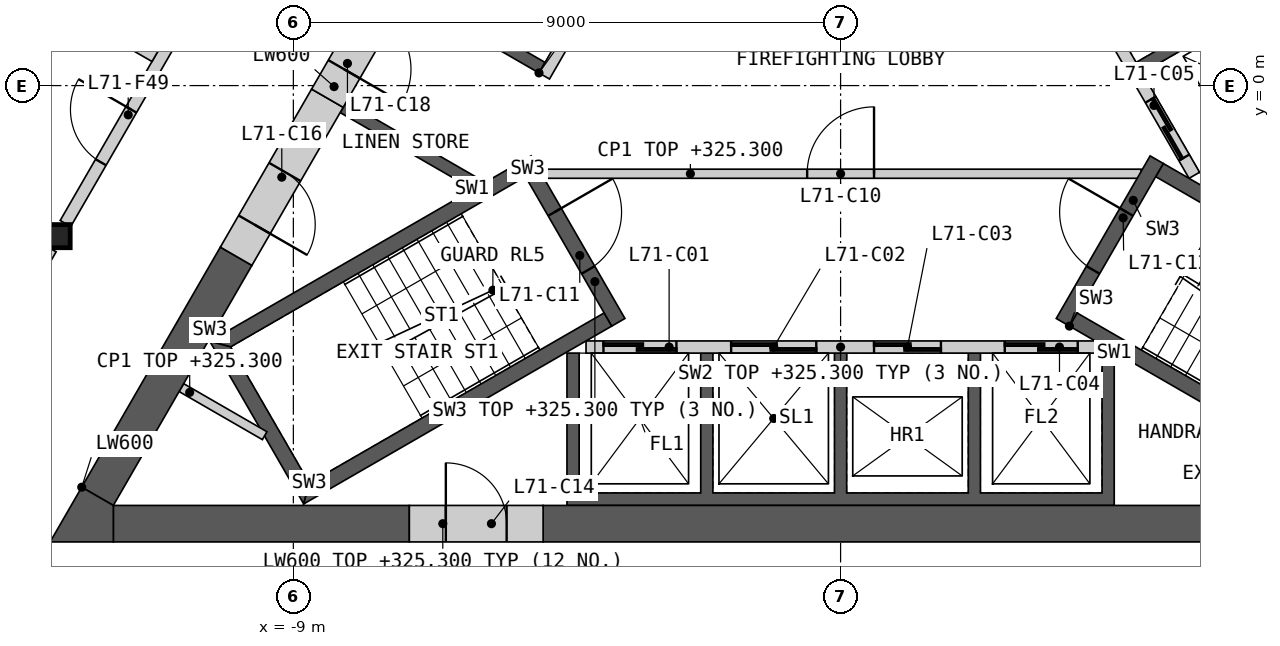
"""IFC4 building model, lengths in metres.
Left out: names, types, materials, properties, quantities, classifications, styles, units other than length and angle.
Written with IfcOpenShell. Run it as: python <this file> out.ifc"""

import sys

from ifc_helpers import new_model, si_unit, direction, frame, frame_2d, origin, origin_2d, place, context, subcontext, project, spatial, polyline, rectangle, i_section, outline, extrude, element, fill, save


model = new_model("IFC4")
c1 = context("Model", 3, precision=1e-05, world=origin(), true_north=direction((0.0, 1.0)))
c2 = subcontext(c1, "Body", "Model", "MODEL_VIEW")
j1 = project(units=[si_unit("LENGTHUNIT", "METRE"), si_unit("PLANEANGLEUNIT", "RADIAN")], contexts=[c1])
p1 = place(None, origin())
s1 = spatial("IfcSite", under=j1, at=p1, CompositionType="ELEMENT")
p2 = place(p1, origin())
s2 = spatial("IfcBuilding", under=s1, at=p2, CompositionType="ELEMENT")
p3 = place(p2, frame((0.0, 0.0, 322.2)))
s3 = spatial("IfcBuildingStorey", under=s2, at=p3, CompositionType="ELEMENT", Elevation=322.2)
p4 = place(p3, frame((-12.868, -2.476, 0.0), z_axis=(0.0, 0.0, 1.0), x_axis=(1.0, 0.0, 0.0)))
e1 = element("IfcColumn", 1, at=p4, inside=s3, PredefinedType="COLUMN", context=c2, shape_type="SweptSolid", body=[
    extrude(i_section(OverallWidth=0.396, OverallDepth=0.381, WebThickness=0.019, FlangeThickness=0.03, at=origin_2d()), origin(), (0.0, 0.0, 1.0), 3.4),
])
p5 = place(p3, origin())
e2 = element("IfcWall", 2, at=p5, inside=s3, PredefinedType="SHEAR", context=c2, shape_type="SweptSolid", body=[
    extrude(outline(polyline([(4.5, -4.4), (4.5, -6.906), (-4.5, -6.906), (-4.5, -4.4), (-4.3, -4.4), (-4.3, -6.7), (-2.3, -6.7), (-2.3, -4.4), (-2.1, -4.4), (-2.1, -6.7), (-0.1, -6.7), (-0.1, -4.4), (0.1, -4.4), (0.1, -6.7), (2.1, -6.7), (2.1, -4.4), (2.3, -4.4), (2.3, -6.7), (4.3, -6.7), (4.3, -4.4), (4.5, -4.4)])), origin(), (0.0, 0.0, 1.0), 3.1),
])
p6 = place(p3, frame((-4.187, -4.3, 0.0), z_axis=(0.0, 0.0, 1.0), x_axis=(1.0, 0.0, 0.0)))
e3 = element("IfcWall", 3, at=p6, inside=s3, PredefinedType="SOLIDWALL", context=c2, shape_type="SweptSolid", body=[
    extrude(rectangle(XDim=8.373, YDim=0.2, at=frame_2d((4.187, 0.0))), origin(), (0.0, 0.0, 1.0), 3.1),
])
p7 = place(p6, frame((0.287, 0.0, 0.0)))
e4 = element("IfcOpeningElement", 4, at=p7, cuts=e3, PredefinedType="OPENING", context=c2, shape_type="SweptSolid", body=[
    extrude(rectangle(XDim=1.2, YDim=2.1, at=frame_2d((0.6, 1.05))), frame((0.0, 0.11, 0.0), z_axis=(0.0, -1.0, 0.0), x_axis=(1.0, 0.0, 0.0)), (0.0, 0.0, 1.0), 0.22),
])
p8 = place(p6, frame((2.387, 0.0, 0.0)))
e5 = element("IfcOpeningElement", 5, at=p8, cuts=e3, PredefinedType="OPENING", context=c2, shape_type="SweptSolid", body=[
    extrude(rectangle(XDim=1.4, YDim=2.1, at=frame_2d((0.7, 1.05))), frame((0.0, 0.11, 0.0), z_axis=(0.0, -1.0, 0.0), x_axis=(1.0, 0.0, 0.0)), (0.0, 0.0, 1.0), 0.22),
])
p9 = place(p6, frame((4.737, 0.0, 0.0)))
e6 = element("IfcOpeningElement", 6, at=p9, cuts=e3, PredefinedType="OPENING", context=c2, shape_type="SweptSolid", body=[
    extrude(rectangle(XDim=1.1, YDim=2.1, at=frame_2d((0.55, 1.05))), frame((0.0, 0.11, 0.0), z_axis=(0.0, -1.0, 0.0), x_axis=(1.0, 0.0, 0.0)), (0.0, 0.0, 1.0), 0.22),
])
p10 = place(p6, frame((6.887, 0.0, 0.0)))
e7 = element("IfcOpeningElement", 7, at=p10, cuts=e3, PredefinedType="OPENING", context=c2, shape_type="SweptSolid", body=[
    extrude(rectangle(XDim=1.2, YDim=2.1, at=frame_2d((0.6, 1.05))), frame((0.0, 0.11, 0.0), z_axis=(0.0, -1.0, 0.0), x_axis=(1.0, 0.0, 0.0)), (0.0, 0.0, 1.0), 0.22),
])
p11 = place(p3, origin())
e8 = element("IfcWall", 8, at=p11, inside=s3, PredefinedType="SHEAR", context=c2, shape_type="SweptSolid", body=[
    extrude(outline(polyline([(1.561, 6.097), (3.731, 7.35), (8.231, -0.444), (6.061, -1.697), (5.96, -1.524), (7.952, -0.374), (6.952, 1.358), (4.96, 0.208), (4.861, 0.381), (6.852, 1.531), (5.852, 3.263), (3.861, 2.113), (3.76, 2.287), (5.752, 3.437), (4.752, 5.169), (2.76, 4.019), (2.66, 4.192), (4.652, 5.342), (3.652, 7.074), (1.66, 5.924), (1.561, 6.097)])), origin(), (0.0, 0.0, 1.0), 3.1),
])
p12 = place(p3, frame((5.817, -1.476, 0.0), z_axis=(0.0, 0.0, 1.0), x_axis=(-0.500002616675, 0.866023893041, 0.0)))
e9 = element("IfcWall", 9, at=p12, inside=s3, PredefinedType="SOLIDWALL", context=c2, shape_type="SweptSolid", body=[
    extrude(rectangle(XDim=8.373, YDim=0.2, at=frame_2d((4.187, 0.0))), origin(), (0.0, 0.0, 1.0), 3.1),
])
p13 = place(p12, frame((0.337, 0.0, 0.0)))
e10 = element("IfcOpeningElement", 10, at=p13, cuts=e9, PredefinedType="OPENING", context=c2, shape_type="SweptSolid", body=[
    extrude(rectangle(XDim=1.1, YDim=2.1, at=frame_2d((0.55, 1.05))), frame((0.0, 0.11, 0.0), z_axis=(0.0, -1.0, 0.0), x_axis=(1.0, 0.0, 0.0)), (0.0, 0.0, 1.0), 0.22),
])
p14 = place(p12, frame((2.537, 0.0, 0.0)))
e11 = element("IfcOpeningElement", 11, at=p14, cuts=e9, PredefinedType="OPENING", context=c2, shape_type="SweptSolid", body=[
    extrude(rectangle(XDim=1.1, YDim=2.1, at=frame_2d((0.55, 1.05))), frame((0.0, 0.11, 0.0), z_axis=(0.0, -1.0, 0.0), x_axis=(1.0, 0.0, 0.0)), (0.0, 0.0, 1.0), 0.22),
])
p15 = place(p12, frame((4.737, 0.0, 0.0)))
e12 = element("IfcOpeningElement", 12, at=p15, cuts=e9, PredefinedType="OPENING", context=c2, shape_type="SweptSolid", body=[
    extrude(rectangle(XDim=1.1, YDim=2.1, at=frame_2d((0.55, 1.05))), frame((0.0, 0.11, 0.0), z_axis=(0.0, -1.0, 0.0), x_axis=(1.0, 0.0, 0.0)), (0.0, 0.0, 1.0), 0.22),
])
p16 = place(p12, frame((7.037, 0.0, 0.0)))
e13 = element("IfcOpeningElement", 13, at=p16, cuts=e9, PredefinedType="OPENING", context=c2, shape_type="SweptSolid", body=[
    extrude(rectangle(XDim=0.9, YDim=2.1, at=frame_2d((0.45, 1.05))), frame((0.0, 0.11, 0.0), z_axis=(0.0, -1.0, 0.0), x_axis=(1.0, 0.0, 0.0)), (0.0, 0.0, 1.0), 0.22),
])
p17 = place(p3, origin())
e14 = element("IfcWall", 14, at=p17, inside=s3, PredefinedType="SHEAR", context=c2, shape_type="SweptSolid", body=[
    extrude(outline(polyline([(-6.061, -1.697), (-8.231, -0.444), (-8.131, -0.271), (-5.96, -1.524), (-6.061, -1.697)])), origin(), (0.0, 0.0, 1.0), 3.1),
])
p18 = place(p3, origin())
e15 = element("IfcWall", 15, at=p18, inside=s3, PredefinedType="SHEAR", context=c2, shape_type="SweptSolid", body=[
    extrude(outline(polyline([(-4.96, 0.208), (-7.131, 1.461), (-3.731, 7.35), (-1.561, 6.097), (-1.66, 5.924), (-3.652, 7.074), (-6.852, 1.531), (-4.861, 0.381), (-4.96, 0.208)])), origin(), (0.0, 0.0, 1.0), 3.1),
])
p19 = place(p3, frame((-1.631, 5.776, 0.0), z_axis=(0.0, 0.0, 1.0), x_axis=(-0.499992876559, -0.866029516466, 0.0)))
e16 = element("IfcWall", 16, at=p19, inside=s3, PredefinedType="SOLIDWALL", context=c2, shape_type="SweptSolid", body=[
    extrude(rectangle(XDim=6.486, YDim=0.2, at=frame_2d((3.243, 0.0))), origin(), (0.0, 0.0, 1.0), 3.1),
])
p20 = place(p19, frame((2.637, 0.0, 0.0)))
e17 = element("IfcOpeningElement", 17, at=p20, cuts=e16, PredefinedType="OPENING", context=c2, shape_type="SweptSolid", body=[
    extrude(rectangle(XDim=0.9, YDim=2.1, at=frame_2d((0.45, 1.05))), frame((0.0, 0.11, 0.0), z_axis=(0.0, -1.0, 0.0), x_axis=(1.0, 0.0, 0.0)), (0.0, 0.0, 1.0), 0.22),
])
p21 = place(p3, frame((-4.941, -1.45, 0.0), z_axis=(0.0, 0.0, 1.0), x_axis=(1.0, 0.0, 0.0)))
e18 = element("IfcWall", 18, at=p21, inside=s3, PredefinedType="PARTITIONING", context=c2, shape_type="SweptSolid", body=[
    extrude(rectangle(XDim=9.882, YDim=0.15, at=frame_2d((4.941, 0.0))), origin(), (0.0, 0.0, 1.0), 3.1),
])
p22 = place(p21, frame((4.391, 0.0, 0.0)))
e19 = element("IfcOpeningElement", 19, at=p22, cuts=e18, PredefinedType="OPENING", context=c2, shape_type="SweptSolid", body=[
    extrude(rectangle(XDim=1.1, YDim=2.1, at=frame_2d((0.55, 1.05))), frame((0.0, 0.085, 0.0), z_axis=(0.0, -1.0, 0.0), x_axis=(1.0, 0.0, 0.0)), (0.0, 0.0, 1.0), 0.17),
])
p23 = place(p3, origin())
e20 = element("IfcWall", 20, at=p23, inside=s3, PredefinedType="SHEAR", context=c2, shape_type="SweptSolid", body=[
    extrude(outline(polyline([(-5.307, -1.281), (-10.374, -4.206), (-10.032, -4.298), (-5.182, -1.498), (-5.307, -1.281)])), origin(), (0.0, 0.0, 1.0), 3.1),
])
p24 = place(p3, origin())
e21 = element("IfcWall", 21, at=p24, inside=s3, PredefinedType="SHEAR", context=c2, shape_type="SweptSolid", body=[
    extrude(outline(polyline([(-10.374, -4.206), (-8.83, -6.881), (-8.738, -6.539), (-10.032, -4.298), (-10.374, -4.206)])), origin(), (0.0, 0.0, 1.0), 3.1),
])
p25 = place(p3, origin())
e22 = element("IfcWall", 22, at=p25, inside=s3, PredefinedType="SHEAR", context=c2, shape_type="SweptSolid", body=[
    extrude(outline(polyline([(-8.738, -6.539), (-8.83, -6.881), (-3.763, -3.956), (-3.888, -3.739), (-8.738, -6.539)])), origin(), (0.0, 0.0, 1.0), 3.1),
])
p26 = place(p3, frame((-5.199, -1.219, 0.0), z_axis=(0.0, 0.0, 1.0), x_axis=(0.499982516597, -0.866035497597, 0.0)))
e23 = element("IfcWall", 23, at=p26, inside=s3, PredefinedType="SHEAR", context=c2, shape_type="SweptSolid", body=[
    extrude(rectangle(XDim=3.088, YDim=0.25, at=frame_2d((1.544, 0.0))), origin(), (0.0, 0.0, 1.0), 3.1),
])
p27 = place(p26, frame((0.994, 0.0, 0.0)))
e24 = element("IfcOpeningElement", 24, at=p27, cuts=e23, PredefinedType="OPENING", context=c2, shape_type="SweptSolid", body=[
    extrude(rectangle(XDim=1.1, YDim=2.1, at=frame_2d((0.55, 1.05))), frame((0.0, 0.135, 0.0), z_axis=(0.0, -1.0, 0.0), x_axis=(1.0, 0.0, 0.0)), (0.0, 0.0, 1.0), 0.27),
])
p28 = place(p3, origin())
e25 = element("IfcWall", 25, at=p28, inside=s3, PredefinedType="SHEAR", context=c2, shape_type="SweptSolid", body=[
    extrude(outline(polyline([(3.763, -3.956), (8.83, -6.881), (8.738, -6.539), (3.888, -3.739), (3.763, -3.956)])), origin(), (0.0, 0.0, 1.0), 3.1),
])
p29 = place(p3, origin())
e26 = element("IfcWall", 26, at=p29, inside=s3, PredefinedType="SHEAR", context=c2, shape_type="SweptSolid", body=[
    extrude(outline(polyline([(10.032, -4.298), (10.374, -4.206), (5.307, -1.281), (5.182, -1.498), (10.032, -4.298)])), origin(), (0.0, 0.0, 1.0), 3.1),
])
p30 = place(p3, frame((3.655, -3.893, 0.0), z_axis=(0.0, 0.0, 1.0), x_axis=(0.499982516597, 0.866035497597, 0.0)))
e27 = element("IfcWall", 27, at=p30, inside=s3, PredefinedType="SHEAR", context=c2, shape_type="SweptSolid", body=[
    extrude(rectangle(XDim=3.088, YDim=0.25, at=frame_2d((1.544, 0.0))), origin(), (0.0, 0.0, 1.0), 3.1),
])
p31 = place(p30, frame((0.994, 0.0, 0.0)))
e28 = element("IfcOpeningElement", 28, at=p31, cuts=e27, PredefinedType="OPENING", context=c2, shape_type="SweptSolid", body=[
    extrude(rectangle(XDim=1.1, YDim=2.1, at=frame_2d((0.55, 1.05))), frame((0.0, 0.135, 0.0), z_axis=(0.0, -1.0, 0.0), x_axis=(1.0, 0.0, 0.0)), (0.0, 0.0, 1.0), 0.27),
])
p32 = place(p3, frame((-10.842, -4.967, 0.0), z_axis=(0.0, 0.0, 1.0), x_axis=(0.866098216386, -0.499873863663, 0.0)))
e29 = element("IfcWall", 29, at=p32, inside=s3, PredefinedType="PARTITIONING", context=c2, shape_type="SweptSolid", body=[
    extrude(rectangle(XDim=1.582, YDim=0.15, at=frame_2d((0.791, 0.0))), origin(), (0.0, 0.0, 1.0), 3.1),
])
p33 = place(p3, frame((-4.892, -7.206, 0.0), z_axis=(0.0, 0.0, 1.0), x_axis=(1.0, 0.0, 0.0)))
e30 = element("IfcWall", 30, at=p33, inside=s3, PredefinedType="SHEAR", context=c2, shape_type="SweptSolid", body=[
    extrude(rectangle(XDim=16.853, YDim=0.6, at=frame_2d((8.426, 0.0))), origin(), (0.0, 0.0, 1.0), 3.1),
])
p34 = place(p3, frame((-11.961, -7.206, 0.0), z_axis=(0.0, 0.0, 1.0), x_axis=(1.0, 0.0, 0.0)))
e31 = element("IfcWall", 31, at=p34, inside=s3, PredefinedType="SHEAR", context=c2, shape_type="SweptSolid", body=[
    extrude(rectangle(XDim=4.868, YDim=0.6, at=frame_2d((2.434, 0.0))), origin(), (0.0, 0.0, 1.0), 3.1),
])
p35 = place(p3, frame((8.686, -0.634, 0.0), z_axis=(0.0, 0.0, 1.0), x_axis=(-0.500004601921, 0.866022746848, 0.0)))
e32 = element("IfcWall", 32, at=p35, inside=s3, PredefinedType="SHEAR", context=c2, shape_type="SweptSolid", body=[
    extrude(rectangle(XDim=16.853, YDim=0.6, at=frame_2d((8.426, 0.0))), origin(), (0.0, 0.0, 1.0), 3.1),
])
p36 = place(p3, frame((-9.941, -2.807, 0.0), z_axis=(0.0, 0.0, 1.0), x_axis=(-0.500020646047, -0.866013483456, 0.0)))
e33 = element("IfcWall", 33, at=p36, inside=s3, PredefinedType="SHEAR", context=c2, shape_type="SweptSolid", body=[
    extrude(rectangle(XDim=4.559, YDim=0.6, at=frame_2d((2.28, 0.0))), origin(), (0.0, 0.0, 1.0), 3.1),
])
p37 = place(p3, origin())
e34 = element("IfcWall", 34, at=p37, inside=s3, PredefinedType="SHEAR", context=c2, shape_type="SweptSolid", body=[
    extrude(outline(polyline([(-12.48, -6.606), (-11.961, -6.906), (-11.961, -7.506), (-13.0, -7.506), (-12.48, -6.606)])), origin(), (0.0, 0.0, 1.0), 3.1),
])
p38 = place(p3, frame((-7.092, -7.206, 0.0), z_axis=(0.0, 0.0, 1.0), x_axis=(1.0, 0.0, 0.0)))
e35 = element("IfcWall", 35, at=p38, inside=s3, PredefinedType="SHEAR", context=c2, shape_type="SweptSolid", body=[
    extrude(rectangle(XDim=2.2, YDim=0.6, at=frame_2d((1.1, 0.0))), origin(), (0.0, 0.0, 1.0), 3.1),
])
p39 = place(p38, frame((0.6, 0.0, 0.0)))
e36 = element("IfcOpeningElement", 36, at=p39, cuts=e35, PredefinedType="OPENING", context=c2, shape_type="SweptSolid", body=[
    extrude(rectangle(XDim=1.0, YDim=2.1, at=frame_2d((0.5, 1.05))), frame((0.0, 0.31, 0.0), z_axis=(0.0, -1.0, 0.0), x_axis=(1.0, 0.0, 0.0)), (0.0, 0.0, 1.0), 0.62),
])
p40 = place(p3, frame((-8.44, -0.208, 0.0), z_axis=(0.0, 0.0, 1.0), x_axis=(-0.499997052475, -0.866027105532, 0.0)))
e37 = element("IfcWall", 37, at=p40, inside=s3, PredefinedType="SHEAR", context=c2, shape_type="SweptSolid", body=[
    extrude(rectangle(XDim=3.001, YDim=0.6, at=frame_2d((1.501, 0.0))), origin(), (0.0, 0.0, 1.0), 3.1),
])
p41 = place(p40, frame((1.4, 0.0, 0.0)))
e38 = element("IfcOpeningElement", 38, at=p41, cuts=e37, PredefinedType="OPENING", context=c2, shape_type="SweptSolid", body=[
    extrude(rectangle(XDim=1.0, YDim=2.1, at=frame_2d((0.5, 1.05))), frame((0.0, 0.31, 0.0), z_axis=(0.0, -1.0, 0.0), x_axis=(1.0, 0.0, 0.0)), (0.0, 0.0, 1.0), 0.62),
])
p42 = place(p3, frame((-7.34, 1.698, 0.0), z_axis=(0.0, 0.0, 1.0), x_axis=(-0.50002983664, -0.866008176907, 0.0)))
e39 = element("IfcWall", 39, at=p42, inside=s3, PredefinedType="SHEAR", context=c2, shape_type="SweptSolid", body=[
    extrude(rectangle(XDim=2.2, YDim=0.6, at=frame_2d((1.1, 0.0))), origin(), (0.0, 0.0, 1.0), 3.1),
])
p43 = place(p42, frame((0.55, 0.0, 0.0)))
e40 = element("IfcOpeningElement", 40, at=p43, cuts=e39, PredefinedType="OPENING", context=c2, shape_type="SweptSolid", body=[
    extrude(rectangle(XDim=1.1, YDim=2.1, at=frame_2d((0.55, 1.05))), frame((0.0, 0.31, 0.0), z_axis=(0.0, -1.0, 0.0), x_axis=(1.0, 0.0, 0.0)), (0.0, 0.0, 1.0), 0.62),
])
p44 = place(p3, frame((-12.748, -2.269, 0.0), z_axis=(0.0, 0.0, 1.0), x_axis=(0.499984266882, 0.866034487114, 0.0)))
e41 = element("IfcWall", 41, at=p44, inside=s3, PredefinedType="PARTITIONING", context=c2, shape_type="SweptSolid", body=[
    extrude(rectangle(XDim=8.099, YDim=0.2, at=frame_2d((4.049, 0.0))), origin(), (0.0, 0.0, 1.0), 3.1),
])
p45 = place(p44, frame((1.164, 0.0, 0.0)))
e42 = element("IfcOpeningElement", 42, at=p45, cuts=e41, PredefinedType="OPENING", context=c2, shape_type="SweptSolid", body=[
    extrude(rectangle(XDim=1.0, YDim=2.1, at=frame_2d((0.5, 1.05))), frame((0.0, 0.11, 0.0), z_axis=(0.0, -1.0, 0.0), x_axis=(1.0, 0.0, 0.0)), (0.0, 0.0, 1.0), 0.22),
])
p46 = place(p3, frame((-15.244, -6.592, 0.0), z_axis=(0.0, 0.0, 1.0), x_axis=(0.49999094734, 0.866030630277, 0.0)))
e43 = element("IfcWall", 43, at=p46, inside=s3, PredefinedType="PARTITIONING", context=c2, shape_type="SweptSolid", body=[
    extrude(rectangle(XDim=4.513, YDim=0.2, at=frame_2d((2.256, 0.0))), origin(), (0.0, 0.0, 1.0), 3.1),
])
p47 = place(p3, frame((-13.471, 1.779, 0.0), z_axis=(0.0, 0.0, 1.0), x_axis=(0.865989465428, -0.500062241894, 0.0)))
e44 = element("IfcWall", 44, at=p47, inside=s3, PredefinedType="PARTITIONING", context=c2, shape_type="SweptSolid", body=[
    extrude(rectangle(XDim=2.55, YDim=0.25, at=frame_2d((1.275, 0.0))), origin(), (0.0, 0.0, 1.0), 2.33),
])
p48 = place(p3, frame((-14.889, -0.577, 0.0), z_axis=(0.0, 0.0, 1.0), x_axis=(0.500015767406, 0.866016300277, 0.0)))
e45 = element("IfcWall", 45, at=p48, inside=s3, PredefinedType="PARTITIONING", context=c2, shape_type="SweptSolid", body=[
    extrude(rectangle(XDim=5.5, YDim=0.1, at=frame_2d((2.75, 0.0))), origin(), (0.0, 0.0, 1.0), 2.33),
])
p49 = place(p7, origin())
e46 = element("IfcDoor", 46, at=p49, inside=s3, OperationType="SLIDING_TO_LEFT", PredefinedType="DOOR", context=c2, shape_type="SweptSolid", body=[
    extrude(rectangle(XDim=1.2, YDim=2.1, at=frame_2d((0.6, 1.05))), frame((0.0, 0.025, 0.0), z_axis=(0.0, -1.0, 0.0), x_axis=(1.0, 0.0, 0.0)), (0.0, 0.0, 1.0), 0.05),
])
fill(e4, e46)
p50 = place(p8, origin())
e47 = element("IfcDoor", 47, at=p50, inside=s3, OperationType="SLIDING_TO_LEFT", PredefinedType="DOOR", context=c2, shape_type="SweptSolid", body=[
    extrude(rectangle(XDim=1.4, YDim=2.1, at=frame_2d((0.7, 1.05))), frame((0.0, 0.025, 0.0), z_axis=(0.0, -1.0, 0.0), x_axis=(1.0, 0.0, 0.0)), (0.0, 0.0, 1.0), 0.05),
])
fill(e5, e47)
p51 = place(p9, origin())
e48 = element("IfcDoor", 48, at=p51, inside=s3, OperationType="SLIDING_TO_LEFT", PredefinedType="DOOR", context=c2, shape_type="SweptSolid", body=[
    extrude(rectangle(XDim=1.1, YDim=2.1, at=frame_2d((0.55, 1.05))), frame((0.0, 0.025, 0.0), z_axis=(0.0, -1.0, 0.0), x_axis=(1.0, 0.0, 0.0)), (0.0, 0.0, 1.0), 0.05),
])
fill(e6, e48)
p52 = place(p10, origin())
e49 = element("IfcDoor", 49, at=p52, inside=s3, OperationType="SLIDING_TO_LEFT", PredefinedType="DOOR", context=c2, shape_type="SweptSolid", body=[
    extrude(rectangle(XDim=1.2, YDim=2.1, at=frame_2d((0.6, 1.05))), frame((0.0, 0.025, 0.0), z_axis=(0.0, -1.0, 0.0), x_axis=(1.0, 0.0, 0.0)), (0.0, 0.0, 1.0), 0.05),
])
fill(e7, e49)
p53 = place(p13, origin())
e50 = element("IfcDoor", 50, at=p53, inside=s3, OperationType="SLIDING_TO_LEFT", PredefinedType="DOOR", context=c2, shape_type="SweptSolid", body=[
    extrude(rectangle(XDim=1.1, YDim=2.1, at=frame_2d((0.55, 1.05))), frame((0.0, 0.025, 0.0), z_axis=(0.0, -1.0, 0.0), x_axis=(1.0, 0.0, 0.0)), (0.0, 0.0, 1.0), 0.05),
])
fill(e10, e50)
p54 = place(p22, origin())
e51 = element("IfcDoor", 51, at=p54, inside=s3, OperationType="SINGLE_SWING_RIGHT", PredefinedType="DOOR", context=c2, shape_type="SweptSolid", body=[
    extrude(rectangle(XDim=1.1, YDim=2.1, at=frame_2d((0.55, 1.05))), frame((0.0, 0.025, 0.0), z_axis=(0.0, -1.0, 0.0), x_axis=(1.0, 0.0, 0.0)), (0.0, 0.0, 1.0), 0.05),
])
fill(e19, e51)
p55 = place(p27, origin())
e52 = element("IfcDoor", 52, at=p55, inside=s3, OperationType="SINGLE_SWING_LEFT", PredefinedType="DOOR", context=c2, shape_type="SweptSolid", body=[
    extrude(rectangle(XDim=1.1, YDim=2.1, at=frame_2d((0.55, 1.05))), frame((0.0, 0.025, 0.0), z_axis=(0.0, -1.0, 0.0), x_axis=(1.0, 0.0, 0.0)), (0.0, 0.0, 1.0), 0.05),
])
fill(e24, e52)
p56 = place(p31, origin())
e53 = element("IfcDoor", 53, at=p56, inside=s3, OperationType="SINGLE_SWING_RIGHT", PredefinedType="DOOR", context=c2, shape_type="SweptSolid", body=[
    extrude(rectangle(XDim=1.1, YDim=2.1, at=frame_2d((0.55, 1.05))), frame((0.0, 0.025, 0.0), z_axis=(0.0, -1.0, 0.0), x_axis=(1.0, 0.0, 0.0)), (0.0, 0.0, 1.0), 0.05),
])
fill(e28, e53)
p57 = place(p39, origin())
e54 = element("IfcDoor", 54, at=p57, inside=s3, OperationType="SINGLE_SWING_LEFT", PredefinedType="DOOR", context=c2, shape_type="SweptSolid", body=[
    extrude(rectangle(XDim=1.0, YDim=2.1, at=frame_2d((0.5, 1.05))), frame((0.0, 0.055, 0.0), z_axis=(0.0, -1.0, 0.0), x_axis=(1.0, 0.0, 0.0)), (0.0, 0.0, 1.0), 0.05),
])
fill(e36, e54)
p58 = place(p41, origin())
e55 = element("IfcDoor", 55, at=p58, inside=s3, OperationType="SINGLE_SWING_RIGHT", PredefinedType="DOOR", context=c2, shape_type="SweptSolid", body=[
    extrude(rectangle(XDim=1.0, YDim=2.1, at=frame_2d((0.5, 1.05))), frame((0.0, 0.055, 0.0), z_axis=(0.0, -1.0, 0.0), x_axis=(1.0, 0.0, 0.0)), (0.0, 0.0, 1.0), 0.05),
])
fill(e38, e55)
p59 = place(p43, origin())
e56 = element("IfcDoor", 56, at=p59, inside=s3, OperationType="SINGLE_SWING_RIGHT", PredefinedType="DOOR", context=c2, shape_type="SweptSolid", body=[
    extrude(rectangle(XDim=1.1, YDim=2.1, at=frame_2d((0.55, 1.05))), frame((0.0, 0.055, 0.0), z_axis=(0.0, -1.0, 0.0), x_axis=(1.0, 0.0, 0.0)), (0.0, 0.0, 1.0), 0.05),
])
fill(e40, e56)
p60 = place(p45, origin())
e57 = element("IfcDoor", 57, at=p60, inside=s3, OperationType="SINGLE_SWING_RIGHT", PredefinedType="DOOR", context=c2, shape_type="SweptSolid", body=[
    extrude(rectangle(XDim=1.0, YDim=2.1, at=frame_2d((0.5, 1.05))), frame((0.0, 0.025, 0.0), z_axis=(0.0, -1.0, 0.0), x_axis=(1.0, 0.0, 0.0)), (0.0, 0.0, 1.0), 0.05),
])
fill(e42, e57)
save(model, sys.argv[1])
